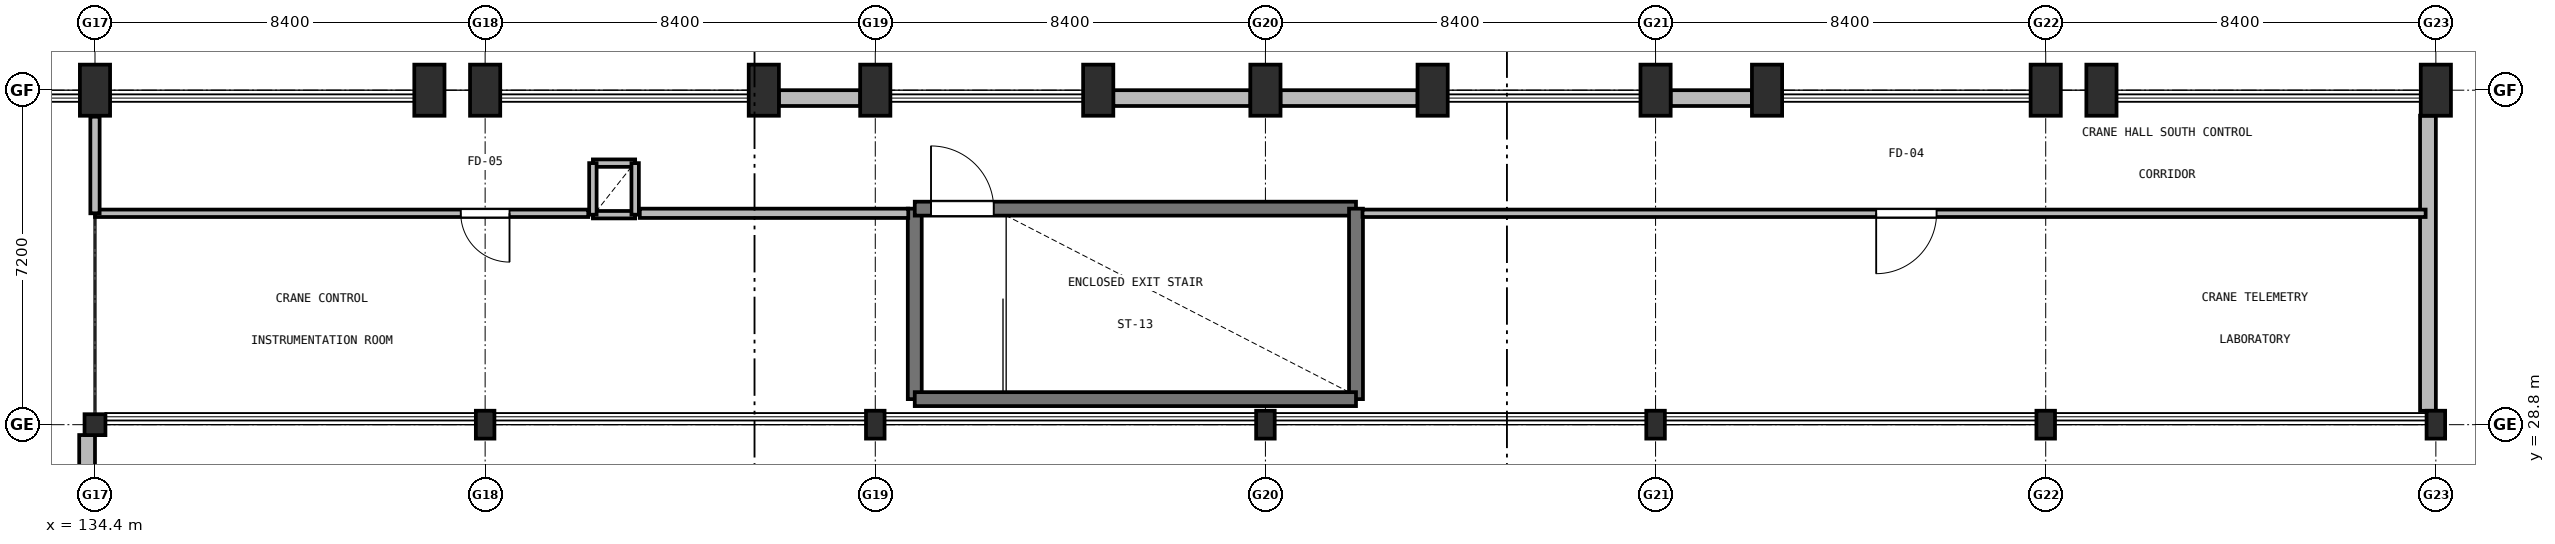
"""IFC4 building model, lengths in metres.
Left out: names, types, materials, properties, quantities, classifications, styles, units other than length and angle.
Written with IfcOpenShell. Run it as: python <this file> out.ifc"""

import sys

from ifc_helpers import new_model, si_unit, direction, frame, frame_2d, origin, origin_2d, place, context, subcontext, project, spatial, rectangle, i_section, extrude, element, fill, save


model = new_model("IFC4")
c1 = context("Model", 3, precision=1e-05, world=origin(), true_north=direction((0.0, 1.0)))
c2 = subcontext(c1, "Body", "Model", "MODEL_VIEW")
j1 = project(units=[si_unit("LENGTHUNIT", "METRE"), si_unit("PLANEANGLEUNIT", "RADIAN")], contexts=[c1])
p1 = place(None, origin())
s1 = spatial("IfcSite", under=j1, at=p1, CompositionType="ELEMENT")
p2 = place(p1, origin())
s2 = spatial("IfcBuilding", under=s1, at=p2, CompositionType="ELEMENT")
p3 = place(p2, frame((0.0, 0.0, 5.1)))
s3 = spatial("IfcBuildingStorey", under=s2, at=p3, CompositionType="ELEMENT", Elevation=5.1)
p4 = place(p3, frame((134.4, 28.8, 0.0), z_axis=(0.0, 0.0, 1.0), x_axis=(1.0, 0.0, 0.0)))
e1 = element("IfcColumn", 1, at=p4, inside=s3, PredefinedType="COLUMN", context=c2, shape_type="SweptSolid", body=[
    extrude(rectangle(XDim=0.45, YDim=0.45, at=origin_2d()), origin(), (0.0, 0.0, 1.0), 4.2),
])
for number, where, z_axis, x_axis in (
    (2, (134.4, 36.0, 0.0), (0.0, 0.0, 1.0), (1.0, 0.0, 0.0)),
    (3, (141.6, 36.0, 0.0), (0.0, 0.0, 1.0), (1.0, 0.0, 0.0)),
):
    element("IfcColumn", number, at=place(p3, frame(where, z_axis=z_axis, x_axis=x_axis)), inside=s3, PredefinedType="COLUMN", context=c2, shape_type="SweptSolid", body=[
        extrude(rectangle(XDim=0.65, YDim=1.1, at=origin_2d()), origin(), (0.0, 0.0, 1.0), 6.3),
    ])
p5 = place(p3, frame((142.8, 28.8, 0.0), z_axis=(0.0, 0.0, 1.0), x_axis=(1.0, 0.0, 0.0)))
e4 = element("IfcColumn", 4, at=p5, inside=s3, PredefinedType="COLUMN", context=c2, shape_type="SweptSolid", body=[
    extrude(rectangle(XDim=0.4, YDim=0.6, at=origin_2d()), origin(), (0.0, 0.0, 1.0), 4.2),
])
for number, where, z_axis, x_axis in (
    (5, (142.8, 36.0, 0.0), (0.0, 0.0, 1.0), (1.0, 0.0, 0.0)),
    (6, (148.8, 36.0, 0.0), (0.0, 0.0, 1.0), (1.0, 0.0, 0.0)),
):
    element("IfcColumn", number, at=place(p3, frame(where, z_axis=z_axis, x_axis=x_axis)), inside=s3, PredefinedType="COLUMN", context=c2, shape_type="SweptSolid", body=[
        extrude(rectangle(XDim=0.65, YDim=1.1, at=origin_2d()), origin(), (0.0, 0.0, 1.0), 6.3),
    ])
p6 = place(p3, frame((151.2, 28.8, 0.0), z_axis=(0.0, 0.0, 1.0), x_axis=(1.0, 0.0, 0.0)))
e7 = element("IfcColumn", 7, at=p6, inside=s3, PredefinedType="COLUMN", context=c2, shape_type="SweptSolid", body=[
    extrude(rectangle(XDim=0.4, YDim=0.6, at=origin_2d()), origin(), (0.0, 0.0, 1.0), 4.2),
])
for number, where, z_axis, x_axis in (
    (8, (151.2, 36.0, 0.0), (0.0, 0.0, 1.0), (1.0, 0.0, 0.0)),
    (9, (156.0, 36.0, 0.0), (0.0, 0.0, 1.0), (1.0, 0.0, 0.0)),
):
    element("IfcColumn", number, at=place(p3, frame(where, z_axis=z_axis, x_axis=x_axis)), inside=s3, PredefinedType="COLUMN", context=c2, shape_type="SweptSolid", body=[
        extrude(rectangle(XDim=0.65, YDim=1.1, at=origin_2d()), origin(), (0.0, 0.0, 1.0), 6.3),
    ])
p7 = place(p3, frame((159.6, 28.8, 0.0), z_axis=(0.0, 0.0, 1.0), x_axis=(1.0, 0.0, 0.0)))
e10 = element("IfcColumn", 10, at=p7, inside=s3, PredefinedType="COLUMN", context=c2, shape_type="SweptSolid", body=[
    extrude(rectangle(XDim=0.4, YDim=0.6, at=origin_2d()), origin(), (0.0, 0.0, 1.0), 4.2),
])
for number, where, z_axis, x_axis in (
    (11, (159.6, 36.0, 0.0), (0.0, 0.0, 1.0), (1.0, 0.0, 0.0)),
    (12, (163.2, 36.0, 0.0), (0.0, 0.0, 1.0), (1.0, 0.0, 0.0)),
):
    element("IfcColumn", number, at=place(p3, frame(where, z_axis=z_axis, x_axis=x_axis)), inside=s3, PredefinedType="COLUMN", context=c2, shape_type="SweptSolid", body=[
        extrude(rectangle(XDim=0.65, YDim=1.1, at=origin_2d()), origin(), (0.0, 0.0, 1.0), 6.3),
    ])
p8 = place(p3, frame((168.0, 28.8, 0.0), z_axis=(0.0, 0.0, 1.0), x_axis=(1.0, 0.0, 0.0)))
e13 = element("IfcColumn", 13, at=p8, inside=s3, PredefinedType="COLUMN", context=c2, shape_type="SweptSolid", body=[
    extrude(rectangle(XDim=0.4, YDim=0.6, at=origin_2d()), origin(), (0.0, 0.0, 1.0), 4.2),
])
for number, where, z_axis, x_axis in (
    (14, (168.0, 36.0, 0.0), (0.0, 0.0, 1.0), (1.0, 0.0, 0.0)),
    (15, (170.4, 36.0, 0.0), (0.0, 0.0, 1.0), (1.0, 0.0, 0.0)),
):
    element("IfcColumn", number, at=place(p3, frame(where, z_axis=z_axis, x_axis=x_axis)), inside=s3, PredefinedType="COLUMN", context=c2, shape_type="SweptSolid", body=[
        extrude(rectangle(XDim=0.65, YDim=1.1, at=origin_2d()), origin(), (0.0, 0.0, 1.0), 6.3),
    ])
p9 = place(p3, frame((176.4, 28.8, 0.0), z_axis=(0.0, 0.0, 1.0), x_axis=(1.0, 0.0, 0.0)))
e16 = element("IfcColumn", 16, at=p9, inside=s3, PredefinedType="COLUMN", context=c2, shape_type="SweptSolid", body=[
    extrude(rectangle(XDim=0.4, YDim=0.6, at=origin_2d()), origin(), (0.0, 0.0, 1.0), 4.2),
])
for number, where, z_axis, x_axis in (
    (17, (176.4, 36.0, 0.0), (0.0, 0.0, 1.0), (1.0, 0.0, 0.0)),
    (18, (177.6, 36.0, 0.0), (0.0, 0.0, 1.0), (1.0, 0.0, 0.0)),
):
    element("IfcColumn", number, at=place(p3, frame(where, z_axis=z_axis, x_axis=x_axis)), inside=s3, PredefinedType="COLUMN", context=c2, shape_type="SweptSolid", body=[
        extrude(rectangle(XDim=0.65, YDim=1.1, at=origin_2d()), origin(), (0.0, 0.0, 1.0), 6.3),
    ])
p10 = place(p3, frame((184.8, 28.8, 0.0), z_axis=(0.0, 0.0, 1.0), x_axis=(1.0, 0.0, 0.0)))
e19 = element("IfcColumn", 19, at=p10, inside=s3, PredefinedType="COLUMN", context=c2, shape_type="SweptSolid", body=[
    extrude(rectangle(XDim=0.4, YDim=0.6, at=origin_2d()), origin(), (0.0, 0.0, 1.0), 4.2),
])
p11 = place(p3, frame((184.8, 36.0, 0.0), z_axis=(0.0, 0.0, 1.0), x_axis=(1.0, 0.0, 0.0)))
e20 = element("IfcColumn", 20, at=p11, inside=s3, PredefinedType="COLUMN", context=c2, shape_type="SweptSolid", body=[
    extrude(rectangle(XDim=0.65, YDim=1.1, at=origin_2d()), origin(), (0.0, 0.0, 1.0), 6.3),
])
p12 = place(p2, origin())
s4 = spatial("IfcBuildingStorey", under=s2, at=p12, CompositionType="ELEMENT", Elevation=0.0)
for number, where, z_axis, x_axis in (
    (21, (134.4, 36.85, 0.0), (0.0, 0.0, 1.0), (1.0, 0.0, 0.0)),
    (22, (142.8, 36.85, 0.0), (0.0, 0.0, 1.0), (1.0, 0.0, 0.0)),
    (23, (151.2, 36.85, 0.0), (0.0, 0.0, 1.0), (1.0, 0.0, 0.0)),
    (24, (159.6, 36.85, 0.0), (0.0, 0.0, 1.0), (1.0, 0.0, 0.0)),
    (25, (168.0, 36.85, 0.0), (0.0, 0.0, 1.0), (1.0, 0.0, 0.0)),
    (26, (176.4, 36.85, 0.0), (0.0, 0.0, 1.0), (1.0, 0.0, 0.0)),
    (27, (184.8, 36.85, 0.0), (0.0, 0.0, 1.0), (1.0, 0.0, 0.0)),
):
    element("IfcColumn", number, at=place(p12, frame(where, z_axis=z_axis, x_axis=x_axis)), inside=s4, PredefinedType="COLUMN", context=c2, shape_type="SweptSolid", body=[
        extrude(i_section(OverallWidth=0.3, OverallDepth=0.36, WebThickness=0.012, FlangeThickness=0.022, FilletRadius=0.027, at=origin_2d()), origin(), (0.0, 0.0, 1.0), 7.155),
    ])
p13 = place(p3, frame((149.123, 35.83, 0.0), z_axis=(0.0, 0.0, 1.0), x_axis=(1.0, 0.0, 0.0)))
e28 = element("IfcWall", 28, at=p13, inside=s3, PredefinedType="SOLIDWALL", context=c2, shape_type="SweptSolid", body=[
    extrude(rectangle(XDim=1.754, YDim=0.34, at=frame_2d((0.877, 0.0))), origin(), (0.0, 0.0, 1.0), 3.348),
])
p14 = place(p3, frame((156.323, 35.83, 0.0), z_axis=(0.0, 0.0, 1.0), x_axis=(1.0, 0.0, 0.0)))
e29 = element("IfcWall", 29, at=p14, inside=s3, PredefinedType="SOLIDWALL", context=c2, shape_type="SweptSolid", body=[
    extrude(rectangle(XDim=2.954, YDim=0.34, at=frame_2d((1.477, 0.0))), origin(), (0.0, 0.0, 1.0), 3.348),
])
p15 = place(p3, frame((159.923, 35.83, 0.0), z_axis=(0.0, 0.0, 1.0), x_axis=(1.0, 0.0, 0.0)))
e30 = element("IfcWall", 30, at=p15, inside=s3, PredefinedType="SOLIDWALL", context=c2, shape_type="SweptSolid", body=[
    extrude(rectangle(XDim=2.954, YDim=0.34, at=frame_2d((1.477, 0.0))), origin(), (0.0, 0.0, 1.0), 3.348),
])
p16 = place(p3, frame((168.323, 35.83, 0.0), z_axis=(0.0, 0.0, 1.0), x_axis=(1.0, 0.0, 0.0)))
e31 = element("IfcWall", 31, at=p16, inside=s3, PredefinedType="SOLIDWALL", context=c2, shape_type="SweptSolid", body=[
    extrude(rectangle(XDim=1.754, YDim=0.34, at=frame_2d((0.877, 0.0))), origin(), (0.0, 0.0, 1.0), 3.348),
])
p17 = place(p3, frame((184.63, 35.452, 0.0), z_axis=(0.0, 0.0, 1.0), x_axis=(0.0, -1.0, 0.0)))
e32 = element("IfcWall", 32, at=p17, inside=s3, PredefinedType="SOLIDWALL", context=c2, shape_type="SweptSolid", body=[
    extrude(rectangle(XDim=6.354, YDim=0.34, at=frame_2d((3.177, 0.0))), origin(), (0.0, 0.0, 1.0), 3.86),
])
p18 = place(p3, frame((134.23, 28.577, 0.0), z_axis=(0.0, 0.0, 1.0), x_axis=(0.0, -1.0, 0.0)))
e33 = element("IfcWall", 33, at=p18, inside=s3, PredefinedType="SOLIDWALL", context=c2, shape_type="SweptSolid", body=[
    extrude(rectangle(XDim=6.754, YDim=0.34, at=frame_2d((3.377, 0.0))), origin(), (0.0, 0.0, 1.0), 3.31),
])
p19 = place(p18, frame((2.677, 0.0, 0.95)))
e34 = element("IfcOpeningElement", 34, at=p19, cuts=e33, PredefinedType="OPENING", context=c2, shape_type="SweptSolid", body=[
    extrude(rectangle(XDim=1.4, YDim=1.9, at=frame_2d((0.7, 0.95))), frame((0.0, 0.18, 0.0), z_axis=(0.0, -1.0, 0.0), x_axis=(1.0, 0.0, 0.0)), (0.0, 0.0, 1.0), 0.36),
])
p20 = place(p3, frame((152.05, 29.35, 0.0), z_axis=(0.0, 0.0, 1.0), x_axis=(0.0, 1.0, 0.0)))
e35 = element("IfcWall", 35, at=p20, inside=s3, PredefinedType="SHEAR", context=c2, shape_type="SweptSolid", body=[
    extrude(rectangle(XDim=4.1, YDim=0.3, at=frame_2d((2.05, 0.0))), origin(), (0.0, 0.0, 1.0), 3.92),
])
p21 = place(p3, frame((152.05, 33.45, 0.0), z_axis=(0.0, 0.0, 1.0), x_axis=(1.0, 0.0, 0.0)))
e36 = element("IfcWall", 36, at=p21, inside=s3, PredefinedType="SHEAR", context=c2, shape_type="SweptSolid", body=[
    extrude(rectangle(XDim=9.5, YDim=0.3, at=frame_2d((4.75, 0.0))), origin(), (0.0, 0.0, 1.0), 3.92),
])
p22 = place(p21, frame((0.35, 0.0, 0.0)))
e37 = element("IfcOpeningElement", 37, at=p22, cuts=e36, PredefinedType="OPENING", context=c2, shape_type="SweptSolid", body=[
    extrude(rectangle(XDim=1.35, YDim=2.2, at=frame_2d((0.675, 1.1))), frame((0.0, 0.16, 0.0), z_axis=(0.0, -1.0, 0.0), x_axis=(1.0, 0.0, 0.0)), (0.0, 0.0, 1.0), 0.32),
])
p23 = place(p3, frame((161.55, 33.45, 0.0), z_axis=(0.0, 0.0, 1.0), x_axis=(0.0, -1.0, 0.0)))
e38 = element("IfcWall", 38, at=p23, inside=s3, PredefinedType="SHEAR", context=c2, shape_type="SweptSolid", body=[
    extrude(rectangle(XDim=4.1, YDim=0.3, at=frame_2d((2.05, 0.0))), origin(), (0.0, 0.0, 1.0), 3.92),
])
p24 = place(p3, frame((161.55, 29.35, 0.0), z_axis=(0.0, 0.0, 1.0), x_axis=(-1.0, 0.0, 0.0)))
e39 = element("IfcWall", 39, at=p24, inside=s3, PredefinedType="SHEAR", context=c2, shape_type="SweptSolid", body=[
    extrude(rectangle(XDim=9.5, YDim=0.3, at=frame_2d((4.75, 0.0))), origin(), (0.0, 0.0, 1.0), 3.92),
])
for number, where, z_axis, x_axis in (
    (40, (145.12, 33.32, 0.0), (0.0, 0.0, 1.0), (1.0, 0.0, 0.0)),
    (41, (146.03, 34.43, 0.0), (0.0, 0.0, 1.0), (-1.0, 0.0, 0.0)),
):
    element("IfcWall", number, at=place(p3, frame(where, z_axis=z_axis, x_axis=x_axis)), inside=s3, PredefinedType="PARTITIONING", context=c2, shape_type="SweptSolid", body=[
        extrude(rectangle(XDim=0.91, YDim=0.16, at=frame_2d((0.455, 0.0))), origin(), (0.0, 0.0, 1.0), 3.65),
    ])
for number, where, z_axis, x_axis in (
    (42, (145.12, 34.43, 0.0), (0.0, 0.0, 1.0), (0.0, -1.0, 0.0)),
    (43, (146.03, 33.32, 0.0), (0.0, 0.0, 1.0), (0.0, 1.0, 0.0)),
):
    element("IfcWall", number, at=place(p3, frame(where, z_axis=z_axis, x_axis=x_axis)), inside=s3, PredefinedType="PARTITIONING", context=c2, shape_type="SweptSolid", body=[
        extrude(rectangle(XDim=1.11, YDim=0.16, at=frame_2d((0.555, 0.0))), origin(), (0.0, 0.0, 1.0), 3.65),
    ])
p25 = place(p3, frame((184.58, 33.35, 0.0), z_axis=(0.0, 0.0, 1.0), x_axis=(-1.0, 0.0, 0.0)))
e44 = element("IfcWall", 44, at=p25, inside=s3, PredefinedType="PARTITIONING", context=c2, shape_type="SweptSolid", body=[
    extrude(rectangle(XDim=22.89, YDim=0.16, at=frame_2d((11.445, 0.0))), origin(), (0.0, 0.0, 1.0), 3.85),
])
p26 = place(p25, frame((10.53, 0.0, 0.0)))
e45 = element("IfcOpeningElement", 45, at=p26, cuts=e44, PredefinedType="OPENING", context=c2, shape_type="SweptSolid", body=[
    extrude(rectangle(XDim=1.3, YDim=2.15, at=frame_2d((0.65, 1.075))), frame((0.0, 0.09, 0.0), z_axis=(0.0, -1.0, 0.0), x_axis=(1.0, 0.0, 0.0)), (0.0, 0.0, 1.0), 0.18),
])
p27 = place(p3, frame((151.91, 33.35, 0.0), z_axis=(0.0, 0.0, 1.0), x_axis=(-1.0, 0.0, 0.0)))
e46 = element("IfcWall", 46, at=p27, inside=s3, PredefinedType="SOLIDWALL", context=c2, shape_type="SweptSolid", body=[
    extrude(rectangle(XDim=5.78, YDim=0.2, at=frame_2d((2.89, 0.0))), origin(), (0.0, 0.0, 1.0), 3.85),
])
p28 = place(p3, frame((145.02, 33.35, 0.0), z_axis=(0.0, 0.0, 1.0), x_axis=(-1.0, 0.0, 0.0)))
e47 = element("IfcWall", 47, at=p28, inside=s3, PredefinedType="PARTITIONING", context=c2, shape_type="SweptSolid", body=[
    extrude(rectangle(XDim=10.62, YDim=0.16, at=frame_2d((5.31, 0.0))), origin(), (0.0, 0.0, 1.0), 3.305),
])
p29 = place(p28, frame((1.695, 0.0, 0.0)))
e48 = element("IfcOpeningElement", 48, at=p29, cuts=e47, PredefinedType="OPENING", context=c2, shape_type="SweptSolid", body=[
    extrude(rectangle(XDim=1.05, YDim=2.15, at=frame_2d((0.525, 1.075))), frame((0.0, 0.09, 0.0), z_axis=(0.0, -1.0, 0.0), x_axis=(1.0, 0.0, 0.0)), (0.0, 0.0, 1.0), 0.18),
])
p30 = place(p3, frame((134.4, 33.35, 0.0), z_axis=(0.0, 0.0, 1.0), x_axis=(0.0, 1.0, 0.0)))
e49 = element("IfcWall", 49, at=p30, inside=s3, PredefinedType="SOLIDWALL", context=c2, shape_type="SweptSolid", body=[
    extrude(rectangle(XDim=2.08, YDim=0.2, at=frame_2d((1.04, 0.0))), origin(), (0.0, 0.0, 1.0), 3.305),
])
p31 = place(p22, origin())
e50 = element("IfcDoor", 50, at=p31, inside=s3, OperationType="SINGLE_SWING_LEFT", PredefinedType="DOOR", context=c2, shape_type="SweptSolid", body=[
    extrude(rectangle(XDim=1.35, YDim=2.2, at=frame_2d((0.675, 1.1))), frame((0.0, 0.025, 0.0), z_axis=(0.0, -1.0, 0.0), x_axis=(1.0, 0.0, 0.0)), (0.0, 0.0, 1.0), 0.05),
])
fill(e37, e50)
p32 = place(p26, origin())
e51 = element("IfcDoor", 51, at=p32, inside=s3, OperationType="SINGLE_SWING_RIGHT", PredefinedType="DOOR", context=c2, shape_type="SweptSolid", body=[
    extrude(rectangle(XDim=1.3, YDim=2.15, at=frame_2d((0.65, 1.075))), frame((0.0, 0.025, 0.0), z_axis=(0.0, -1.0, 0.0), x_axis=(1.0, 0.0, 0.0)), (0.0, 0.0, 1.0), 0.05),
])
fill(e45, e51)
p33 = place(p29, origin())
e52 = element("IfcDoor", 52, at=p33, inside=s3, OperationType="SINGLE_SWING_LEFT", PredefinedType="DOOR", context=c2, shape_type="SweptSolid", body=[
    extrude(rectangle(XDim=1.05, YDim=2.15, at=frame_2d((0.525, 1.075))), frame((0.0, 0.025, 0.0), z_axis=(0.0, -1.0, 0.0), x_axis=(1.0, 0.0, 0.0)), (0.0, 0.0, 1.0), 0.05),
])
fill(e48, e52)
save(model, sys.argv[1])
